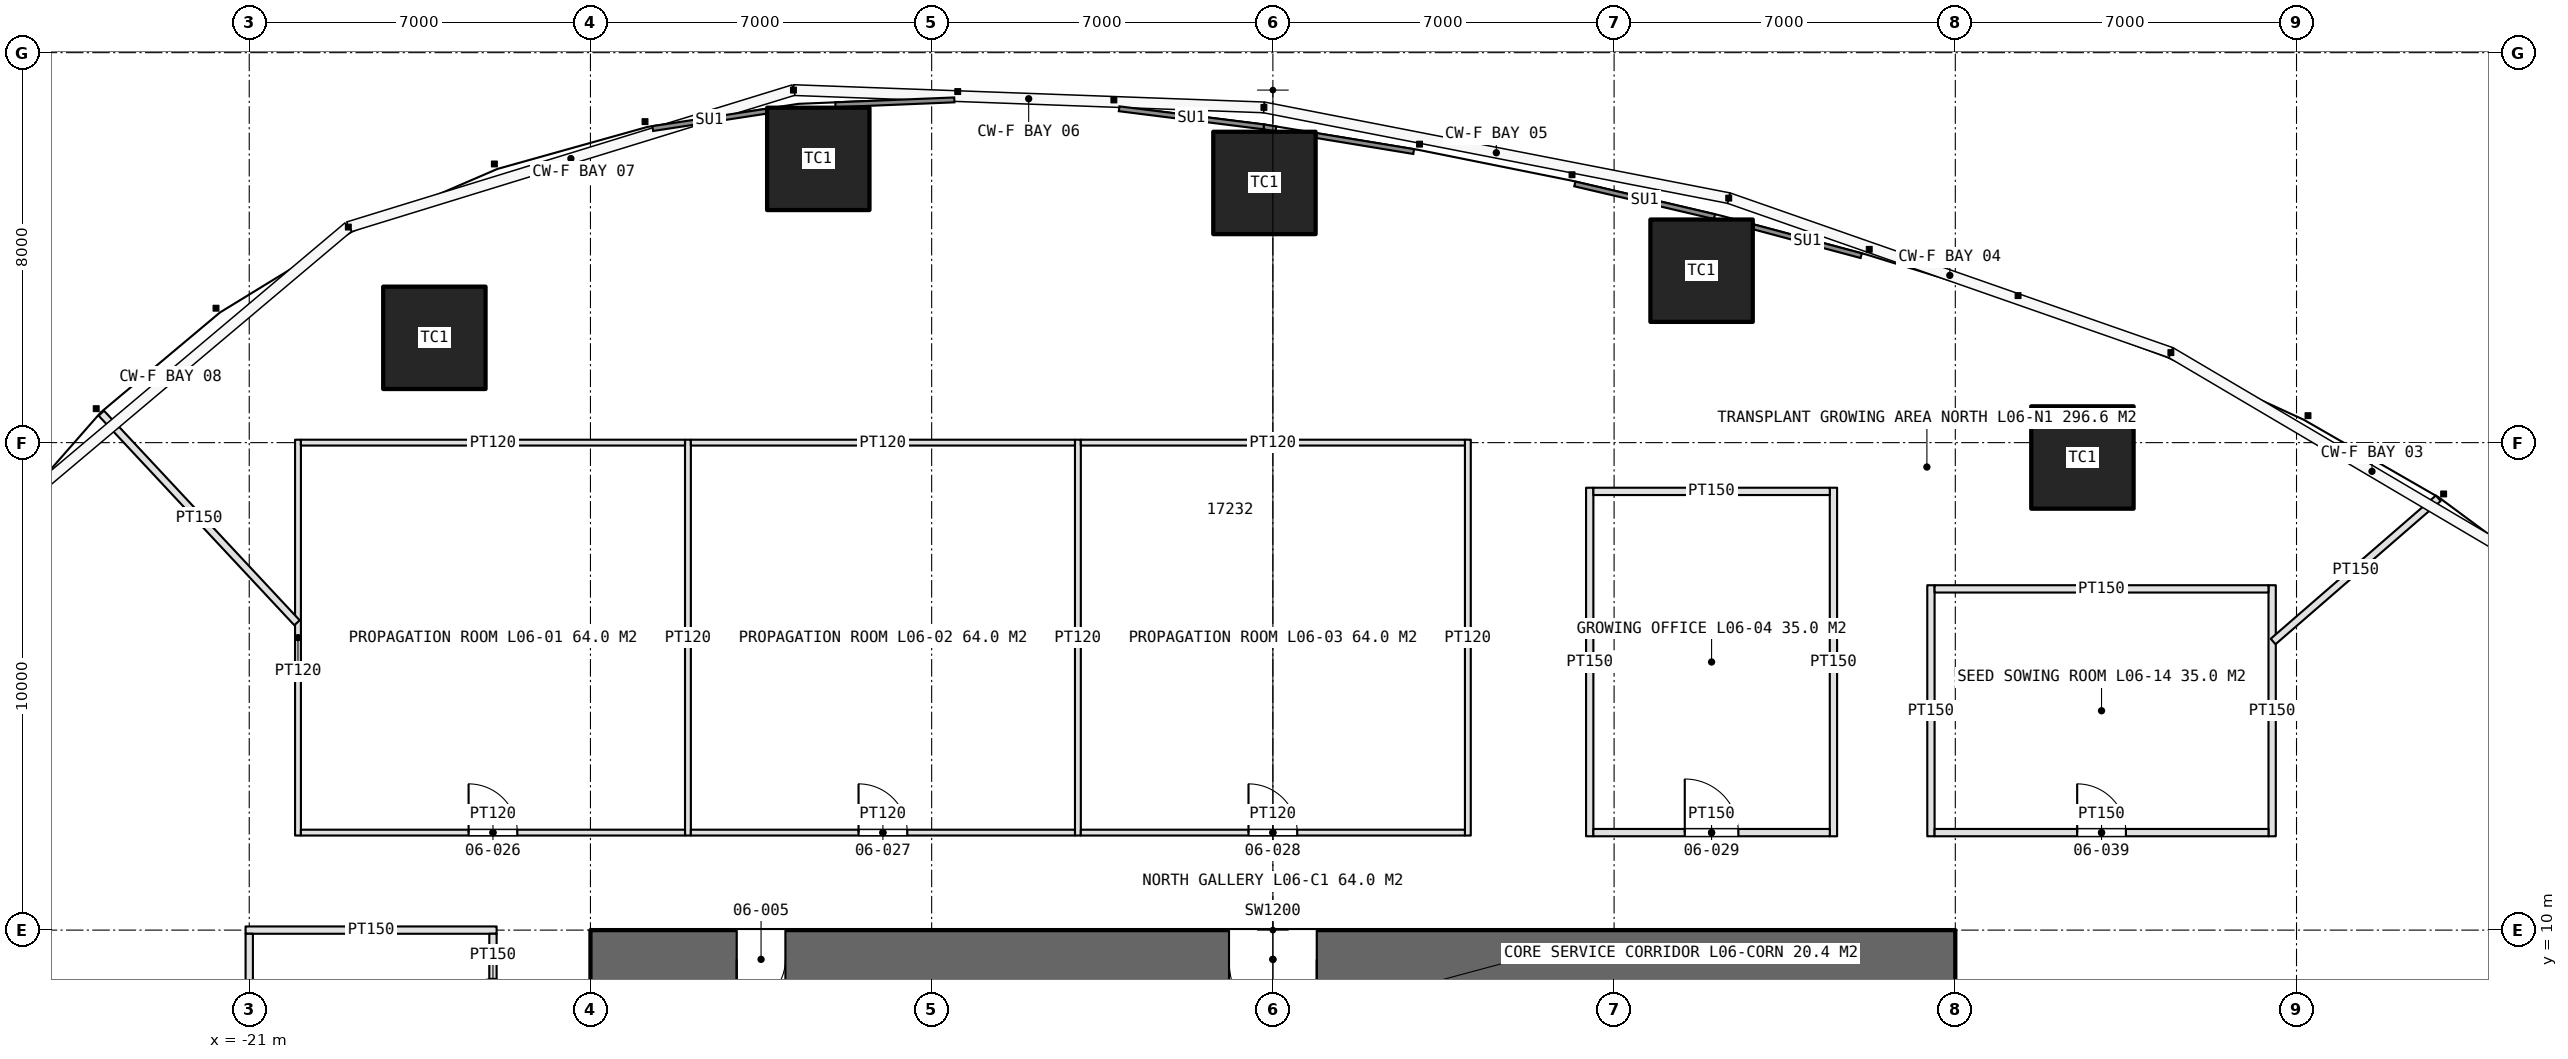
"""IFC4 building model, lengths in metres.
Left out: names, types, materials, properties, quantities, classifications, styles, units other than length and angle.
Written with IfcOpenShell. Run it as: python <this file> out.ifc"""

import sys

from ifc_helpers import new_model, si_unit, direction, frame, frame_2d, origin, origin_2d, place, context, subcontext, project, spatial, rectangle, extrude, element, fill, save


model = new_model("IFC4")
c1 = context("Model", 3, precision=1e-05, world=origin(), true_north=direction((0.0, 1.0)))
c2 = subcontext(c1, "Body", "Model", "MODEL_VIEW")
j1 = project(units=[si_unit("LENGTHUNIT", "METRE"), si_unit("PLANEANGLEUNIT", "RADIAN")], contexts=[c1])
p1 = place(None, origin())
s1 = spatial("IfcSite", under=j1, at=p1, CompositionType="ELEMENT")
p2 = place(p1, origin())
s2 = spatial("IfcBuilding", under=s1, at=p2, CompositionType="ELEMENT")
p3 = place(p2, frame((0.0, 0.0, 30.0)))
s3 = spatial("IfcBuildingStorey", under=s2, at=p3, CompositionType="ELEMENT", Elevation=30.0)
p4 = place(p3, frame((14.0, 9.4, 0.0), z_axis=(0.0, 0.0, 1.0), x_axis=(-1.0, 0.0, 0.0)))
e1 = element("IfcWall", 1, at=p4, inside=s3, PredefinedType="SHEAR", context=c2, shape_type="SweptSolid", body=[
    extrude(rectangle(XDim=28.0, YDim=1.2, at=frame_2d((14.0, 0.0))), origin(), (0.0, 0.0, 1.0), 5.0),
])
p5 = place(p4, frame((24.0, 0.0, 0.0)))
e2 = element("IfcOpeningElement", 2, at=p5, cuts=e1, PredefinedType="OPENING", context=c2, shape_type="SweptSolid", body=[
    extrude(rectangle(XDim=1.0, YDim=2.4, at=frame_2d((0.5, 1.2))), frame((0.0, 0.61, 0.0), z_axis=(0.0, -1.0, 0.0), x_axis=(1.0, 0.0, 0.0)), (0.0, 0.0, 1.0), 1.22),
])
p6 = place(p4, frame((13.1, 0.0, 0.0)))
e3 = element("IfcOpeningElement", 3, at=p6, cuts=e1, PredefinedType="OPENING", context=c2, shape_type="SweptSolid", body=[
    extrude(rectangle(XDim=1.8, YDim=2.4, at=frame_2d((0.9, 1.2))), frame((0.0, 0.61, 0.0), z_axis=(0.0, -1.0, 0.0), x_axis=(1.0, 0.0, 0.0)), (0.0, 0.0, 1.0), 1.22),
])
for number, where, z_axis, x_axis in (
    (4, (16.608, 19.695, 0.0), (0.0, 0.0, 1.0), (1.0, 0.0, 0.0)),
    (5, (8.795, 23.527, 0.0), (0.0, 0.0, 1.0), (1.0, 0.0, 0.0)),
    (6, (-0.173, 25.327, 0.0), (0.0, 0.0, 1.0), (1.0, 0.0, 0.0)),
    (7, (-9.326, 25.821, 0.0), (0.0, 0.0, 1.0), (1.0, 0.0, 0.0)),
    (8, (-17.202, 22.15, 0.0), (0.0, 0.0, 1.0), (1.0, 0.0, 0.0)),
):
    element("IfcColumn", number, at=place(p3, frame(where, z_axis=z_axis, x_axis=x_axis)), inside=s3, PredefinedType="COLUMN", context=c2, shape_type="SweptSolid", body=[
        extrude(rectangle(XDim=2.1, YDim=2.1, at=origin_2d()), origin(), (0.0, 0.0, 1.0), 5.0),
    ])
for number, where, z_axis, x_axis in (
    (9, (-20.0, 11.94, 0.0), (0.0, 0.0, 1.0), (0.0, 1.0, 0.0)),
    (10, (-12.0, 11.94, 0.0), (0.0, 0.0, 1.0), (0.0, 1.0, 0.0)),
    (11, (-4.0, 11.94, 0.0), (0.0, 0.0, 1.0), (0.0, 1.0, 0.0)),
    (12, (4.0, 11.94, 0.0), (0.0, 0.0, 1.0), (0.0, 1.0, 0.0)),
):
    element("IfcWall", number, at=place(p3, frame(where, z_axis=z_axis, x_axis=x_axis)), inside=s3, PredefinedType="PARTITIONING", context=c2, shape_type="SweptSolid", body=[
        extrude(rectangle(XDim=8.12, YDim=0.12, at=frame_2d((4.06, 0.0))), origin(), (0.0, 0.0, 1.0), 3.6),
    ])
p7 = place(p3, frame((-19.94, 12.0, 0.0), z_axis=(0.0, 0.0, 1.0), x_axis=(1.0, 0.0, 0.0)))
e13 = element("IfcWall", 13, at=p7, inside=s3, PredefinedType="PARTITIONING", context=c2, shape_type="SweptSolid", body=[
    extrude(rectangle(XDim=7.88, YDim=0.12, at=frame_2d((3.94, 0.0))), origin(), (0.0, 0.0, 1.0), 3.6),
])
p8 = place(p7, frame((3.44, 0.0, 0.0)))
e14 = element("IfcOpeningElement", 14, at=p8, cuts=e13, PredefinedType="OPENING", context=c2, shape_type="SweptSolid", body=[
    extrude(rectangle(XDim=1.0, YDim=2.2, at=frame_2d((0.5, 1.1))), frame((0.0, 0.07, 0.0), z_axis=(0.0, -1.0, 0.0), x_axis=(1.0, 0.0, 0.0)), (0.0, 0.0, 1.0), 0.14),
])
p9 = place(p3, frame((-19.94, 20.0, 0.0), z_axis=(0.0, 0.0, 1.0), x_axis=(1.0, 0.0, 0.0)))
e15 = element("IfcWall", 15, at=p9, inside=s3, PredefinedType="PARTITIONING", context=c2, shape_type="SweptSolid", body=[
    extrude(rectangle(XDim=7.88, YDim=0.12, at=frame_2d((3.94, 0.0))), origin(), (0.0, 0.0, 1.0), 3.6),
])
p10 = place(p3, frame((-11.94, 12.0, 0.0), z_axis=(0.0, 0.0, 1.0), x_axis=(1.0, 0.0, 0.0)))
e16 = element("IfcWall", 16, at=p10, inside=s3, PredefinedType="PARTITIONING", context=c2, shape_type="SweptSolid", body=[
    extrude(rectangle(XDim=7.88, YDim=0.12, at=frame_2d((3.94, 0.0))), origin(), (0.0, 0.0, 1.0), 3.6),
])
p11 = place(p10, frame((3.44, 0.0, 0.0)))
e17 = element("IfcOpeningElement", 17, at=p11, cuts=e16, PredefinedType="OPENING", context=c2, shape_type="SweptSolid", body=[
    extrude(rectangle(XDim=1.0, YDim=2.2, at=frame_2d((0.5, 1.1))), frame((0.0, 0.07, 0.0), z_axis=(0.0, -1.0, 0.0), x_axis=(1.0, 0.0, 0.0)), (0.0, 0.0, 1.0), 0.14),
])
p12 = place(p3, frame((-11.94, 20.0, 0.0), z_axis=(0.0, 0.0, 1.0), x_axis=(1.0, 0.0, 0.0)))
e18 = element("IfcWall", 18, at=p12, inside=s3, PredefinedType="PARTITIONING", context=c2, shape_type="SweptSolid", body=[
    extrude(rectangle(XDim=7.88, YDim=0.12, at=frame_2d((3.94, 0.0))), origin(), (0.0, 0.0, 1.0), 3.6),
])
p13 = place(p3, frame((-3.94, 12.0, 0.0), z_axis=(0.0, 0.0, 1.0), x_axis=(1.0, 0.0, 0.0)))
e19 = element("IfcWall", 19, at=p13, inside=s3, PredefinedType="PARTITIONING", context=c2, shape_type="SweptSolid", body=[
    extrude(rectangle(XDim=7.88, YDim=0.12, at=frame_2d((3.94, 0.0))), origin(), (0.0, 0.0, 1.0), 3.6),
])
p14 = place(p13, frame((3.44, 0.0, 0.0)))
e20 = element("IfcOpeningElement", 20, at=p14, cuts=e19, PredefinedType="OPENING", context=c2, shape_type="SweptSolid", body=[
    extrude(rectangle(XDim=1.0, YDim=2.2, at=frame_2d((0.5, 1.1))), frame((0.0, 0.07, 0.0), z_axis=(0.0, -1.0, 0.0), x_axis=(1.0, 0.0, 0.0)), (0.0, 0.0, 1.0), 0.14),
])
p15 = place(p3, frame((-3.94, 20.0, 0.0), z_axis=(0.0, 0.0, 1.0), x_axis=(1.0, 0.0, 0.0)))
e21 = element("IfcWall", 21, at=p15, inside=s3, PredefinedType="PARTITIONING", context=c2, shape_type="SweptSolid", body=[
    extrude(rectangle(XDim=7.88, YDim=0.12, at=frame_2d((3.94, 0.0))), origin(), (0.0, 0.0, 1.0), 3.6),
])
for number, where, z_axis, x_axis in (
    (22, (6.5, 11.925, 0.0), (0.0, 0.0, 1.0), (0.0, 1.0, 0.0)),
    (23, (11.5, 11.925, 0.0), (0.0, 0.0, 1.0), (0.0, 1.0, 0.0)),
):
    element("IfcWall", number, at=place(p3, frame(where, z_axis=z_axis, x_axis=x_axis)), inside=s3, PredefinedType="PARTITIONING", context=c2, shape_type="SweptSolid", body=[
        extrude(rectangle(XDim=7.15, YDim=0.15, at=frame_2d((3.575, 0.0))), origin(), (0.0, 0.0, 1.0), 3.6),
    ])
p16 = place(p3, frame((6.575, 12.0, 0.0), z_axis=(0.0, 0.0, 1.0), x_axis=(1.0, 0.0, 0.0)))
e24 = element("IfcWall", 24, at=p16, inside=s3, PredefinedType="PARTITIONING", context=c2, shape_type="SweptSolid", body=[
    extrude(rectangle(XDim=4.85, YDim=0.15, at=frame_2d((2.425, 0.0))), origin(), (0.0, 0.0, 1.0), 3.6),
])
p17 = place(p16, frame((1.875, 0.0, 0.0)))
e25 = element("IfcOpeningElement", 25, at=p17, cuts=e24, PredefinedType="OPENING", context=c2, shape_type="SweptSolid", body=[
    extrude(rectangle(XDim=1.1, YDim=2.3, at=frame_2d((0.55, 1.15))), frame((0.0, 0.085, 0.0), z_axis=(0.0, -1.0, 0.0), x_axis=(1.0, 0.0, 0.0)), (0.0, 0.0, 1.0), 0.17),
])
p18 = place(p3, frame((6.575, 19.0, 0.0), z_axis=(0.0, 0.0, 1.0), x_axis=(1.0, 0.0, 0.0)))
e26 = element("IfcWall", 26, at=p18, inside=s3, PredefinedType="PARTITIONING", context=c2, shape_type="SweptSolid", body=[
    extrude(rectangle(XDim=4.85, YDim=0.15, at=frame_2d((2.425, 0.0))), origin(), (0.0, 0.0, 1.0), 3.6),
])
for number, where, z_axis, x_axis in (
    (27, (13.5, 11.925, 0.0), (0.0, 0.0, 1.0), (0.0, 1.0, 0.0)),
    (28, (20.5, 11.925, 0.0), (0.0, 0.0, 1.0), (0.0, 1.0, 0.0)),
):
    element("IfcWall", number, at=place(p3, frame(where, z_axis=z_axis, x_axis=x_axis)), inside=s3, PredefinedType="PARTITIONING", context=c2, shape_type="SweptSolid", body=[
        extrude(rectangle(XDim=5.15, YDim=0.15, at=frame_2d((2.575, 0.0))), origin(), (0.0, 0.0, 1.0), 3.6),
    ])
p19 = place(p3, frame((13.575, 12.0, 0.0), z_axis=(0.0, 0.0, 1.0), x_axis=(1.0, 0.0, 0.0)))
e29 = element("IfcWall", 29, at=p19, inside=s3, PredefinedType="PARTITIONING", context=c2, shape_type="SweptSolid", body=[
    extrude(rectangle(XDim=6.85, YDim=0.15, at=frame_2d((3.425, 0.0))), origin(), (0.0, 0.0, 1.0), 3.6),
])
p20 = place(p19, frame((2.925, 0.0, 0.0)))
e30 = element("IfcOpeningElement", 30, at=p20, cuts=e29, PredefinedType="OPENING", context=c2, shape_type="SweptSolid", body=[
    extrude(rectangle(XDim=1.0, YDim=2.2, at=frame_2d((0.5, 1.1))), frame((0.0, 0.085, 0.0), z_axis=(0.0, -1.0, 0.0), x_axis=(1.0, 0.0, 0.0)), (0.0, 0.0, 1.0), 0.17),
])
p21 = place(p3, frame((13.575, 17.0, 0.0), z_axis=(0.0, 0.0, 1.0), x_axis=(1.0, 0.0, 0.0)))
e31 = element("IfcWall", 31, at=p21, inside=s3, PredefinedType="PARTITIONING", context=c2, shape_type="SweptSolid", body=[
    extrude(rectangle(XDim=6.85, YDim=0.15, at=frame_2d((3.425, 0.0))), origin(), (0.0, 0.0, 1.0), 3.6),
])
p22 = place(p3, frame((-15.925, 10.0, 0.0), z_axis=(0.0, 0.0, 1.0), x_axis=(-1.0, 0.0, 0.0)))
e32 = element("IfcWall", 32, at=p22, inside=s3, PredefinedType="PARTITIONING", context=c2, shape_type="SweptSolid", body=[
    extrude(rectangle(XDim=5.15, YDim=0.15, at=frame_2d((2.575, 0.0))), origin(), (0.0, 0.0, 1.0), 3.6),
])
p23 = place(p3, frame((-16.0, 7.075, 0.0), z_axis=(0.0, 0.0, 1.0), x_axis=(0.0, 1.0, 0.0)))
e33 = element("IfcWall", 33, at=p23, inside=s3, PredefinedType="PARTITIONING", context=c2, shape_type="SweptSolid", body=[
    extrude(rectangle(XDim=2.85, YDim=0.15, at=frame_2d((1.425, 0.0))), origin(), (0.0, 0.0, 1.0), 3.6),
])
p24 = place(p23, frame((0.925, 0.0, 0.0)))
e34 = element("IfcOpeningElement", 34, at=p24, cuts=e33, PredefinedType="OPENING", context=c2, shape_type="SweptSolid", body=[
    extrude(rectangle(XDim=1.0, YDim=2.2, at=frame_2d((0.5, 1.1))), frame((0.0, 0.085, 0.0), z_axis=(0.0, -1.0, 0.0), x_axis=(1.0, 0.0, 0.0)), (0.0, 0.0, 1.0), 0.17),
])
p25 = place(p3, frame((-21.0, 7.075, 0.0), z_axis=(0.0, 0.0, 1.0), x_axis=(0.0, 1.0, 0.0)))
e35 = element("IfcWall", 35, at=p25, inside=s3, PredefinedType="PARTITIONING", context=c2, shape_type="SweptSolid", body=[
    extrude(rectangle(XDim=2.85, YDim=0.15, at=frame_2d((1.425, 0.0))), origin(), (0.0, 0.0, 1.0), 3.6),
])
p26 = place(p3, frame((-20.02, 16.305, 0.0), z_axis=(0.0, 0.0, 1.0), x_axis=(-0.682516386928, 0.730870290527, 0.0)))
e36 = element("IfcWall", 36, at=p26, inside=s3, PredefinedType="PARTITIONING", context=c2, shape_type="SweptSolid", body=[
    extrude(rectangle(XDim=5.882, YDim=0.15, at=frame_2d((2.941, 0.0))), origin(), (0.0, 0.0, 1.0), 3.6),
])
p27 = place(p3, frame((20.52, 15.92, 0.0), z_axis=(0.0, 0.0, 1.0), x_axis=(0.75543578361, 0.655222692557, 0.0)))
e37 = element("IfcWall", 37, at=p27, inside=s3, PredefinedType="PARTITIONING", context=c2, shape_type="SweptSolid", body=[
    extrude(rectangle(XDim=4.485, YDim=0.15, at=frame_2d((2.243, 0.0))), origin(), (0.0, 0.0, 1.0), 3.6),
])
p28 = place(p5, origin())
e38 = element("IfcDoor", 38, at=p28, inside=s3, OperationType="SINGLE_SWING_RIGHT", PredefinedType="DOOR", context=c2, shape_type="SweptSolid", body=[
    extrude(rectangle(XDim=1.0, YDim=2.4, at=frame_2d((0.5, 1.2))), frame((0.0, 0.025, 0.0), z_axis=(0.0, -1.0, 0.0), x_axis=(1.0, 0.0, 0.0)), (0.0, 0.0, 1.0), 0.05),
])
fill(e2, e38)
p29 = place(p6, origin())
e39 = element("IfcDoor", 39, at=p29, inside=s3, OperationType="DOUBLE_DOOR_SINGLE_SWING", PredefinedType="DOOR", context=c2, shape_type="SweptSolid", body=[
    extrude(rectangle(XDim=1.8, YDim=2.4, at=frame_2d((0.9, 1.2))), frame((0.0, 0.025, 0.0), z_axis=(0.0, -1.0, 0.0), x_axis=(1.0, 0.0, 0.0)), (0.0, 0.0, 1.0), 0.05),
])
fill(e3, e39)
p30 = place(p8, origin())
e40 = element("IfcDoor", 40, at=p30, inside=s3, OperationType="SINGLE_SWING_LEFT", PredefinedType="DOOR", context=c2, shape_type="SweptSolid", body=[
    extrude(rectangle(XDim=1.0, YDim=2.2, at=frame_2d((0.5, 1.1))), frame((0.0, 0.025, 0.0), z_axis=(0.0, -1.0, 0.0), x_axis=(1.0, 0.0, 0.0)), (0.0, 0.0, 1.0), 0.05),
])
fill(e14, e40)
p31 = place(p11, origin())
e41 = element("IfcDoor", 41, at=p31, inside=s3, OperationType="SINGLE_SWING_LEFT", PredefinedType="DOOR", context=c2, shape_type="SweptSolid", body=[
    extrude(rectangle(XDim=1.0, YDim=2.2, at=frame_2d((0.5, 1.1))), frame((0.0, 0.025, 0.0), z_axis=(0.0, -1.0, 0.0), x_axis=(1.0, 0.0, 0.0)), (0.0, 0.0, 1.0), 0.05),
])
fill(e17, e41)
p32 = place(p14, origin())
e42 = element("IfcDoor", 42, at=p32, inside=s3, OperationType="SINGLE_SWING_LEFT", PredefinedType="DOOR", context=c2, shape_type="SweptSolid", body=[
    extrude(rectangle(XDim=1.0, YDim=2.2, at=frame_2d((0.5, 1.1))), frame((0.0, 0.025, 0.0), z_axis=(0.0, -1.0, 0.0), x_axis=(1.0, 0.0, 0.0)), (0.0, 0.0, 1.0), 0.05),
])
fill(e20, e42)
p33 = place(p17, origin())
e43 = element("IfcDoor", 43, at=p33, inside=s3, OperationType="SINGLE_SWING_LEFT", PredefinedType="DOOR", context=c2, shape_type="SweptSolid", body=[
    extrude(rectangle(XDim=1.1, YDim=2.3, at=frame_2d((0.55, 1.15))), frame((0.0, 0.025, 0.0), z_axis=(0.0, -1.0, 0.0), x_axis=(1.0, 0.0, 0.0)), (0.0, 0.0, 1.0), 0.05),
])
fill(e25, e43)
p34 = place(p20, origin())
e44 = element("IfcDoor", 44, at=p34, inside=s3, OperationType="SINGLE_SWING_LEFT", PredefinedType="DOOR", context=c2, shape_type="SweptSolid", body=[
    extrude(rectangle(XDim=1.0, YDim=2.2, at=frame_2d((0.5, 1.1))), frame((0.0, 0.025, 0.0), z_axis=(0.0, -1.0, 0.0), x_axis=(1.0, 0.0, 0.0)), (0.0, 0.0, 1.0), 0.05),
])
fill(e30, e44)
save(model, sys.argv[1])
